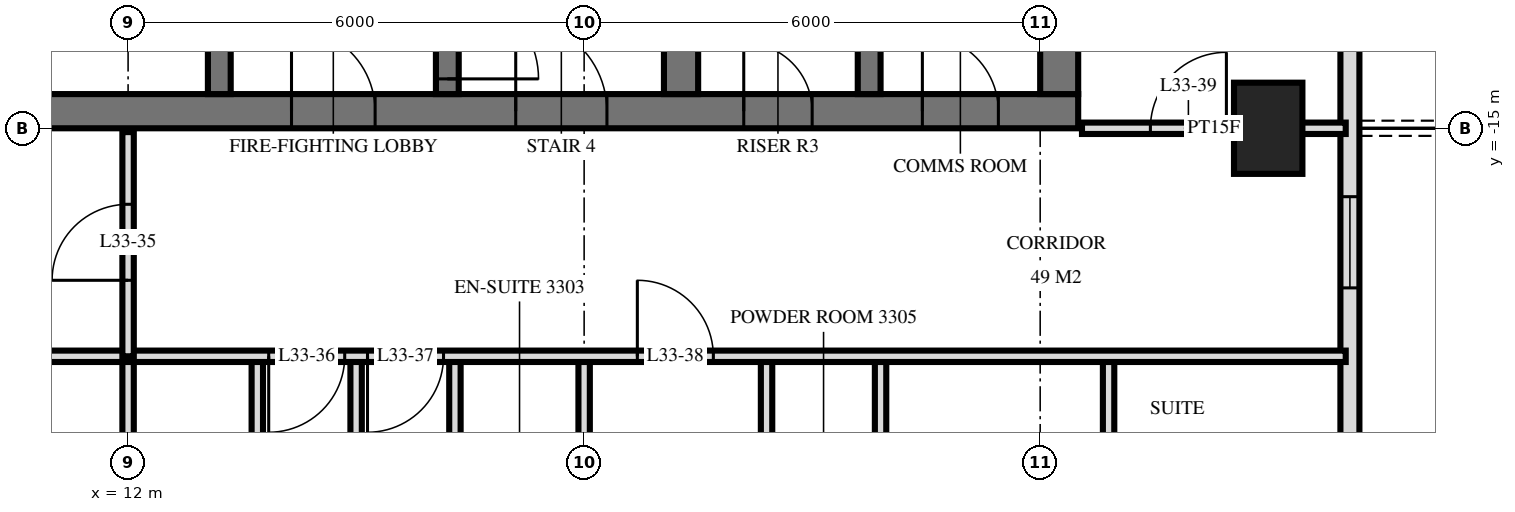
"""IFC4 building model, lengths in metres.
Left out: names, types, materials, properties, quantities, classifications, styles, units other than length and angle.
Written with IfcOpenShell. Run it as: python <this file> out.ifc"""

import sys

from ifc_helpers import new_model, si_unit, direction, frame, frame_2d, origin, origin_2d, place, context, subcontext, project, spatial, rectangle, extrude, element, fill, save


model = new_model("IFC4")
c1 = context("Model", 3, precision=1e-05, world=origin(), true_north=direction((0.0, 1.0)))
c2 = subcontext(c1, "Body", "Model", "MODEL_VIEW")
j1 = project(units=[si_unit("LENGTHUNIT", "METRE"), si_unit("PLANEANGLEUNIT", "RADIAN")], contexts=[c1])
p1 = place(None, origin())
s1 = spatial("IfcSite", under=j1, at=p1, CompositionType="ELEMENT")
p2 = place(p1, origin())
s2 = spatial("IfcBuilding", under=s1, at=p2, CompositionType="ELEMENT")
p3 = place(p2, frame((0.0, 0.0, 130.8)))
s3 = spatial("IfcBuildingStorey", under=s2, at=p3, CompositionType="ELEMENT", Elevation=130.8)
p4 = place(p3, frame((27.0, -15.0, 0.0), z_axis=(0.0, 0.0, 1.0), x_axis=(0.0, 1.0, 0.0)))
e1 = element("IfcColumn", 1, at=p4, inside=s3, PredefinedType="COLUMN", context=c2, shape_type="SweptSolid", body=[
    extrude(rectangle(XDim=1.2, YDim=0.9, at=origin_2d()), origin(), (0.0, 0.0, 1.0), 3.6),
])
p5 = place(p3, frame((10.0, -14.775, 0.0), z_axis=(0.0, 0.0, 1.0), x_axis=(1.0, 0.0, 0.0)))
e2 = element("IfcWall", 2, at=p5, inside=s3, PredefinedType="SHEAR", context=c2, shape_type="SweptSolid", body=[
    extrude(rectangle(XDim=14.5, YDim=0.45, at=frame_2d((7.25, 0.0))), origin(), (0.0, 0.0, 1.0), 3.6),
])
p6 = place(p5, frame((7.1, 0.0, 0.0)))
e3 = element("IfcOpeningElement", 3, at=p6, cuts=e2, PredefinedType="OPENING", context=c2, shape_type="SweptSolid", body=[
    extrude(rectangle(XDim=1.2, YDim=2.1, at=frame_2d((0.6, 1.05))), frame((0.0, 0.235, 0.0), z_axis=(0.0, -1.0, 0.0), x_axis=(1.0, 0.0, 0.0)), (0.0, 0.0, 1.0), 0.47),
])
p7 = place(p5, frame((4.15, 0.0, 0.0)))
e4 = element("IfcOpeningElement", 4, at=p7, cuts=e2, PredefinedType="OPENING", context=c2, shape_type="SweptSolid", body=[
    extrude(rectangle(XDim=1.1, YDim=2.1, at=frame_2d((0.55, 1.05))), frame((0.0, 0.235, 0.0), z_axis=(0.0, -1.0, 0.0), x_axis=(1.0, 0.0, 0.0)), (0.0, 0.0, 1.0), 0.47),
])
p8 = place(p5, frame((10.1, 0.0, 0.0)))
e5 = element("IfcOpeningElement", 5, at=p8, cuts=e2, PredefinedType="OPENING", context=c2, shape_type="SweptSolid", body=[
    extrude(rectangle(XDim=0.9, YDim=2.1, at=frame_2d((0.45, 1.05))), frame((0.0, 0.235, 0.0), z_axis=(0.0, -1.0, 0.0), x_axis=(1.0, 0.0, 0.0)), (0.0, 0.0, 1.0), 0.47),
])
p9 = place(p5, frame((12.45, 0.0, 0.0)))
e6 = element("IfcOpeningElement", 6, at=p9, cuts=e2, PredefinedType="OPENING", context=c2, shape_type="SweptSolid", body=[
    extrude(rectangle(XDim=1.0, YDim=2.1, at=frame_2d((0.5, 1.05))), frame((0.0, 0.235, 0.0), z_axis=(0.0, -1.0, 0.0), x_axis=(1.0, 0.0, 0.0)), (0.0, 0.0, 1.0), 0.47),
])
p10 = place(p3, frame((24.25, -14.55, 0.0), z_axis=(0.0, 0.0, 1.0), x_axis=(0.0, 1.0, 0.0)))
e7 = element("IfcWall", 7, at=p10, inside=s3, PredefinedType="SHEAR", context=c2, shape_type="SweptSolid", body=[
    extrude(rectangle(XDim=14.1, YDim=0.5, at=frame_2d((7.05, 0.0))), origin(), (0.0, 0.0, 1.0), 3.6),
])
p11 = place(p3, frame((13.2, -14.55, 0.0), z_axis=(0.0, 0.0, 1.0), x_axis=(0.0, 1.0, 0.0)))
e8 = element("IfcWall", 8, at=p11, inside=s3, PredefinedType="SHEAR", context=c2, shape_type="SweptSolid", body=[
    extrude(rectangle(XDim=5.4, YDim=0.3, at=frame_2d((2.7, 0.0))), origin(), (0.0, 0.0, 1.0), 3.6),
])
p12 = place(p11, frame((4.0, 0.0, 0.0)))
e9 = element("IfcOpeningElement", 9, at=p12, cuts=e8, PredefinedType="OPENING", context=c2, shape_type="SweptSolid", body=[
    extrude(rectangle(XDim=1.2, YDim=2.1, at=frame_2d((0.6, 1.05))), frame((0.0, 0.16, 0.0), z_axis=(0.0, -1.0, 0.0), x_axis=(1.0, 0.0, 0.0)), (0.0, 0.0, 1.0), 0.32),
])
p13 = place(p3, frame((16.2, -14.55, 0.0), z_axis=(0.0, 0.0, 1.0), x_axis=(0.0, 1.0, 0.0)))
e10 = element("IfcWall", 10, at=p13, inside=s3, PredefinedType="SHEAR", context=c2, shape_type="SweptSolid", body=[
    extrude(rectangle(XDim=5.4, YDim=0.3, at=frame_2d((2.7, 0.0))), origin(), (0.0, 0.0, 1.0), 3.6),
])
p14 = place(p13, frame((0.2, 0.0, 0.0)))
e11 = element("IfcOpeningElement", 11, at=p14, cuts=e10, PredefinedType="OPENING", context=c2, shape_type="SweptSolid", body=[
    extrude(rectangle(XDim=1.2, YDim=2.1, at=frame_2d((0.6, 1.05))), frame((0.0, 0.16, 0.0), z_axis=(0.0, -1.0, 0.0), x_axis=(1.0, 0.0, 0.0)), (0.0, 0.0, 1.0), 0.32),
])
p15 = place(p3, frame((19.275, -14.55, 0.0), z_axis=(0.0, 0.0, 1.0), x_axis=(0.0, 1.0, 0.0)))
e12 = element("IfcWall", 12, at=p15, inside=s3, PredefinedType="SHEAR", context=c2, shape_type="SweptSolid", body=[
    extrude(rectangle(XDim=5.4, YDim=0.45, at=frame_2d((2.7, 0.0))), origin(), (0.0, 0.0, 1.0), 3.6),
])
p16 = place(p3, frame((21.75, -14.55, 0.0), z_axis=(0.0, 0.0, 1.0), x_axis=(0.0, 1.0, 0.0)))
e13 = element("IfcWall", 13, at=p16, inside=s3, PredefinedType="SHEAR", context=c2, shape_type="SweptSolid", body=[
    extrude(rectangle(XDim=5.4, YDim=0.3, at=frame_2d((2.7, 0.0))), origin(), (0.0, 0.0, 1.0), 3.6),
])
p17 = place(p3, frame((28.075, -29.275, 0.0), z_axis=(0.0, 0.0, 1.0), x_axis=(0.0, 1.0, 0.0)))
e14 = element("IfcWall", 14, at=p17, inside=s3, PredefinedType="SOLIDWALL", context=c2, shape_type="SweptSolid", body=[
    extrude(rectangle(XDim=25.951, YDim=0.25, at=frame_2d((12.975, 0.0))), origin(), (0.0, 0.0, 1.0), 3.32),
])
p18 = place(p17, frame((0.575, 0.0, 0.0)))
e15 = element("IfcOpeningElement", 15, at=p18, cuts=e14, PredefinedType="OPENING", context=c2, shape_type="SweptSolid", body=[
    extrude(rectangle(XDim=1.8, YDim=2.4, at=frame_2d((0.9, 1.2))), frame((0.0, 0.135, 0.0), z_axis=(0.0, -1.0, 0.0), x_axis=(1.0, 0.0, 0.0)), (0.0, 0.0, 1.0), 0.27),
])
p19 = place(p17, frame((3.325, 0.0, 0.3)))
e16 = element("IfcOpeningElement", 16, at=p19, cuts=e14, PredefinedType="OPENING", context=c2, shape_type="SweptSolid", body=[
    extrude(rectangle(XDim=1.8, YDim=2.1, at=frame_2d((0.9, 1.05))), frame((0.0, 0.135, 0.0), z_axis=(0.0, -1.0, 0.0), x_axis=(1.0, 0.0, 0.0)), (0.0, 0.0, 1.0), 0.27),
])
p20 = place(p17, frame((8.275, 0.0, 0.0)))
e17 = element("IfcOpeningElement", 17, at=p20, cuts=e14, PredefinedType="OPENING", context=c2, shape_type="SweptSolid", body=[
    extrude(rectangle(XDim=1.8, YDim=2.4, at=frame_2d((0.9, 1.2))), frame((0.0, 0.135, 0.0), z_axis=(0.0, -1.0, 0.0), x_axis=(1.0, 0.0, 0.0)), (0.0, 0.0, 1.0), 0.27),
])
p21 = place(p17, frame((12.175, 0.0, 0.3)))
e18 = element("IfcOpeningElement", 18, at=p21, cuts=e14, PredefinedType="OPENING", context=c2, shape_type="SweptSolid", body=[
    extrude(rectangle(XDim=1.2, YDim=2.1, at=frame_2d((0.6, 1.05))), frame((0.0, 0.135, 0.0), z_axis=(0.0, -1.0, 0.0), x_axis=(1.0, 0.0, 0.0)), (0.0, 0.0, 1.0), 0.27),
])
p22 = place(p17, frame((16.375, 0.0, 0.0)))
e19 = element("IfcOpeningElement", 19, at=p22, cuts=e14, PredefinedType="OPENING", context=c2, shape_type="SweptSolid", body=[
    extrude(rectangle(XDim=1.8, YDim=2.4, at=frame_2d((0.9, 1.2))), frame((0.0, 0.135, 0.0), z_axis=(0.0, -1.0, 0.0), x_axis=(1.0, 0.0, 0.0)), (0.0, 0.0, 1.0), 0.27),
])
p23 = place(p3, frame((24.9, -22.2, 0.0), z_axis=(0.0, 0.0, 1.0), x_axis=(0.0, 1.0, 0.0)))
e20 = element("IfcWall", 20, at=p23, inside=s3, PredefinedType="PARTITIONING", context=c2, shape_type="SweptSolid", body=[
    extrude(rectangle(XDim=4.2, YDim=0.15, at=frame_2d((2.1, 0.0))), origin(), (0.0, 0.0, 1.0), 3.32),
])
p24 = place(p3, frame((21.9, -22.2, 0.0), z_axis=(0.0, 0.0, 1.0), x_axis=(0.0, 1.0, 0.0)))
e21 = element("IfcWall", 21, at=p24, inside=s3, PredefinedType="PLUMBINGWALL", context=c2, shape_type="SweptSolid", body=[
    extrude(rectangle(XDim=4.2, YDim=0.15, at=frame_2d((2.1, 0.0))), origin(), (0.0, 0.0, 1.0), 3.32),
])
p25 = place(p3, frame((20.4, -22.2, 0.0), z_axis=(0.0, 0.0, 1.0), x_axis=(0.0, 1.0, 0.0)))
e22 = element("IfcWall", 22, at=p25, inside=s3, PredefinedType="PARTITIONING", context=c2, shape_type="SweptSolid", body=[
    extrude(rectangle(XDim=4.2, YDim=0.15, at=frame_2d((2.1, 0.0))), origin(), (0.0, 0.0, 1.0), 3.32),
])
p26 = place(p25, frame((1.6, 0.0, 0.0)))
e23 = element("IfcOpeningElement", 23, at=p26, cuts=e22, PredefinedType="OPENING", context=c2, shape_type="SweptSolid", body=[
    extrude(rectangle(XDim=1.0, YDim=2.1, at=frame_2d((0.5, 1.05))), frame((0.0, 0.085, 0.0), z_axis=(0.0, -1.0, 0.0), x_axis=(1.0, 0.0, 0.0)), (0.0, 0.0, 1.0), 0.17),
])
p27 = place(p3, frame((18.0, -22.2, 0.0), z_axis=(0.0, 0.0, 1.0), x_axis=(0.0, 1.0, 0.0)))
e24 = element("IfcWall", 24, at=p27, inside=s3, PredefinedType="PARTITIONING", context=c2, shape_type="SweptSolid", body=[
    extrude(rectangle(XDim=4.2, YDim=0.15, at=frame_2d((2.1, 0.0))), origin(), (0.0, 0.0, 1.0), 3.32),
])
p28 = place(p3, frame((16.3, -23.0, 0.0), z_axis=(0.0, 0.0, 1.0), x_axis=(0.0, 1.0, 0.0)))
e25 = element("IfcWall", 25, at=p28, inside=s3, PredefinedType="PARTITIONING", context=c2, shape_type="SweptSolid", body=[
    extrude(rectangle(XDim=5.0, YDim=0.15, at=frame_2d((2.5, 0.0))), origin(), (0.0, 0.0, 1.0), 3.32),
])
p29 = place(p28, frame((2.12, 0.0, 0.0)))
e26 = element("IfcOpeningElement", 26, at=p29, cuts=e25, PredefinedType="OPENING", context=c2, shape_type="SweptSolid", body=[
    extrude(rectangle(XDim=0.8, YDim=2.1, at=frame_2d((0.4, 1.05))), frame((0.0, 0.085, 0.0), z_axis=(0.0, -1.0, 0.0), x_axis=(1.0, 0.0, 0.0)), (0.0, 0.0, 1.0), 0.17),
])
p30 = place(p3, frame((15.0, -33.62, 0.0), z_axis=(0.0, 0.0, 1.0), x_axis=(0.0, 1.0, 0.0)))
e27 = element("IfcWall", 27, at=p30, inside=s3, PredefinedType="PARTITIONING", context=c2, shape_type="SweptSolid", body=[
    extrude(rectangle(XDim=15.62, YDim=0.15, at=frame_2d((7.81, 0.0))), origin(), (0.0, 0.0, 1.0), 3.32),
])
p31 = place(p3, frame((13.7, -23.0, 0.0), z_axis=(0.0, 0.0, 1.0), x_axis=(0.0, 1.0, 0.0)))
e28 = element("IfcWall", 28, at=p31, inside=s3, PredefinedType="PARTITIONING", context=c2, shape_type="SweptSolid", body=[
    extrude(rectangle(XDim=5.0, YDim=0.15, at=frame_2d((2.5, 0.0))), origin(), (0.0, 0.0, 1.0), 3.32),
])
p32 = place(p31, frame((2.08, 0.0, 0.0)))
e29 = element("IfcOpeningElement", 29, at=p32, cuts=e28, PredefinedType="OPENING", context=c2, shape_type="SweptSolid", body=[
    extrude(rectangle(XDim=0.8, YDim=2.1, at=frame_2d((0.4, 1.05))), frame((0.0, 0.085, 0.0), z_axis=(0.0, -1.0, 0.0), x_axis=(1.0, 0.0, 0.0)), (0.0, 0.0, 1.0), 0.17),
])
p33 = place(p3, frame((12.0, -18.0, 0.0), z_axis=(0.0, 0.0, 1.0), x_axis=(0.0, 1.0, 0.0)))
e30 = element("IfcWall", 30, at=p33, inside=s3, PredefinedType="PARTITIONING", context=c2, shape_type="SweptSolid", body=[
    extrude(rectangle(XDim=2.95, YDim=0.15, at=frame_2d((1.475, 0.0))), origin(), (0.0, 0.0, 1.0), 3.32),
])
p34 = place(p33, frame((1.0, 0.0, 0.0)))
e31 = element("IfcOpeningElement", 31, at=p34, cuts=e30, PredefinedType="OPENING", context=c2, shape_type="SweptSolid", body=[
    extrude(rectangle(XDim=1.0, YDim=2.1, at=frame_2d((0.5, 1.05))), frame((0.0, 0.085, 0.0), z_axis=(0.0, -1.0, 0.0), x_axis=(1.0, 0.0, 0.0)), (0.0, 0.0, 1.0), 0.17),
])
p35 = place(p3, frame((12.0, -33.62, 0.0), z_axis=(0.0, 0.0, 1.0), x_axis=(0.0, 1.0, 0.0)))
e32 = element("IfcWall", 32, at=p35, inside=s3, PredefinedType="PARTITIONING", context=c2, shape_type="SweptSolid", body=[
    extrude(rectangle(XDim=15.62, YDim=0.15, at=frame_2d((7.81, 0.0))), origin(), (0.0, 0.0, 1.0), 3.32),
])
p36 = place(p3, frame((-28.02, -18.0, 0.0), z_axis=(0.0, 0.0, 1.0), x_axis=(1.0, 0.0, 0.0)))
e33 = element("IfcWall", 33, at=p36, inside=s3, PredefinedType="PARTITIONING", context=c2, shape_type="SweptSolid", body=[
    extrude(rectangle(XDim=56.04, YDim=0.15, at=frame_2d((28.02, 0.0))), origin(), (0.0, 0.0, 1.0), 3.32),
])
p37 = place(p36, frame((13.17, 0.0, 0.0)))
e34 = element("IfcOpeningElement", 34, at=p37, cuts=e33, PredefinedType="OPENING", context=c2, shape_type="SweptSolid", body=[
    extrude(rectangle(XDim=1.0, YDim=2.1, at=frame_2d((0.5, 1.05))), frame((0.0, 0.085, 0.0), z_axis=(0.0, -1.0, 0.0), x_axis=(1.0, 0.0, 0.0)), (0.0, 0.0, 1.0), 0.17),
])
p38 = place(p36, frame((11.32, 0.0, 0.0)))
e35 = element("IfcOpeningElement", 35, at=p38, cuts=e33, PredefinedType="OPENING", context=c2, shape_type="SweptSolid", body=[
    extrude(rectangle(XDim=1.0, YDim=2.1, at=frame_2d((0.5, 1.05))), frame((0.0, 0.085, 0.0), z_axis=(0.0, -1.0, 0.0), x_axis=(1.0, 0.0, 0.0)), (0.0, 0.0, 1.0), 0.17),
])
p39 = place(p36, frame((41.87, 0.0, 0.0)))
e36 = element("IfcOpeningElement", 36, at=p39, cuts=e33, PredefinedType="OPENING", context=c2, shape_type="SweptSolid", body=[
    extrude(rectangle(XDim=1.0, YDim=2.1, at=frame_2d((0.5, 1.05))), frame((0.0, 0.085, 0.0), z_axis=(0.0, -1.0, 0.0), x_axis=(1.0, 0.0, 0.0)), (0.0, 0.0, 1.0), 0.17),
])
p40 = place(p36, frame((43.17, 0.0, 0.0)))
e37 = element("IfcOpeningElement", 37, at=p40, cuts=e33, PredefinedType="OPENING", context=c2, shape_type="SweptSolid", body=[
    extrude(rectangle(XDim=1.0, YDim=2.1, at=frame_2d((0.5, 1.05))), frame((0.0, 0.085, 0.0), z_axis=(0.0, -1.0, 0.0), x_axis=(1.0, 0.0, 0.0)), (0.0, 0.0, 1.0), 0.17),
])
p41 = place(p36, frame((46.72, 0.0, 0.0)))
e38 = element("IfcOpeningElement", 38, at=p41, cuts=e33, PredefinedType="OPENING", context=c2, shape_type="SweptSolid", body=[
    extrude(rectangle(XDim=1.0, YDim=2.1, at=frame_2d((0.5, 1.05))), frame((0.0, 0.085, 0.0), z_axis=(0.0, -1.0, 0.0), x_axis=(1.0, 0.0, 0.0)), (0.0, 0.0, 1.0), 0.17),
])
p42 = place(p36, frame((21.52, 0.0, 0.0)))
e39 = element("IfcOpeningElement", 39, at=p42, cuts=e33, PredefinedType="OPENING", context=c2, shape_type="SweptSolid", body=[
    extrude(rectangle(XDim=1.0, YDim=2.1, at=frame_2d((0.5, 1.05))), frame((0.0, 0.085, 0.0), z_axis=(0.0, -1.0, 0.0), x_axis=(1.0, 0.0, 0.0)), (0.0, 0.0, 1.0), 0.17),
])
p43 = place(p36, frame((33.52, 0.0, 0.0)))
e40 = element("IfcOpeningElement", 40, at=p43, cuts=e33, PredefinedType="OPENING", context=c2, shape_type="SweptSolid", body=[
    extrude(rectangle(XDim=1.0, YDim=2.1, at=frame_2d((0.5, 1.05))), frame((0.0, 0.085, 0.0), z_axis=(0.0, -1.0, 0.0), x_axis=(1.0, 0.0, 0.0)), (0.0, 0.0, 1.0), 0.17),
])
p44 = place(p3, frame((24.55, -15.0, 0.0), z_axis=(0.0, 0.0, 1.0), x_axis=(1.0, 0.0, 0.0)))
e41 = element("IfcWall", 41, at=p44, inside=s3, PredefinedType="PARTITIONING", context=c2, shape_type="SweptSolid", body=[
    extrude(rectangle(XDim=3.47, YDim=0.15, at=frame_2d((1.735, 0.0))), origin(), (0.0, 0.0, 1.0), 3.32),
])
p45 = place(p44, frame((0.9, 0.0, 0.0)))
e42 = element("IfcOpeningElement", 42, at=p45, cuts=e41, PredefinedType="OPENING", context=c2, shape_type="SweptSolid", body=[
    extrude(rectangle(XDim=1.0, YDim=2.1, at=frame_2d((0.5, 1.05))), frame((0.0, 0.085, 0.0), z_axis=(0.0, -1.0, 0.0), x_axis=(1.0, 0.0, 0.0)), (0.0, 0.0, 1.0), 0.17),
])
p46 = place(p21, origin())
e43 = element("IfcWindow", 43, at=p46, inside=s3, PartitioningType="SINGLE_PANEL", PredefinedType="WINDOW", context=c2, shape_type="SweptSolid", body=[
    extrude(rectangle(XDim=1.2, YDim=2.1, at=frame_2d((0.6, 1.05))), frame((0.0, 0.03, 0.0), z_axis=(0.0, -1.0, 0.0), x_axis=(1.0, 0.0, 0.0)), (0.0, 0.0, 1.0), 0.06),
])
fill(e18, e43)
p47 = place(p6, origin())
e44 = element("IfcDoor", 44, at=p47, inside=s3, OperationType="SINGLE_SWING_RIGHT", PredefinedType="DOOR", context=c2, shape_type="SweptSolid", body=[
    extrude(rectangle(XDim=1.2, YDim=2.1, at=frame_2d((0.6, 1.05))), frame((0.0, 0.025, 0.0), z_axis=(0.0, -1.0, 0.0), x_axis=(1.0, 0.0, 0.0)), (0.0, 0.0, 1.0), 0.05),
])
fill(e3, e44)
p48 = place(p7, origin())
e45 = element("IfcDoor", 45, at=p48, inside=s3, OperationType="SINGLE_SWING_RIGHT", PredefinedType="DOOR", context=c2, shape_type="SweptSolid", body=[
    extrude(rectangle(XDim=1.1, YDim=2.1, at=frame_2d((0.55, 1.05))), frame((0.0, 0.025, 0.0), z_axis=(0.0, -1.0, 0.0), x_axis=(1.0, 0.0, 0.0)), (0.0, 0.0, 1.0), 0.05),
])
fill(e4, e45)
p49 = place(p8, origin())
e46 = element("IfcDoor", 46, at=p49, inside=s3, OperationType="SINGLE_SWING_RIGHT", PredefinedType="DOOR", context=c2, shape_type="SweptSolid", body=[
    extrude(rectangle(XDim=0.9, YDim=2.1, at=frame_2d((0.45, 1.05))), frame((0.0, 0.025, 0.0), z_axis=(0.0, -1.0, 0.0), x_axis=(1.0, 0.0, 0.0)), (0.0, 0.0, 1.0), 0.05),
])
fill(e5, e46)
p50 = place(p9, origin())
e47 = element("IfcDoor", 47, at=p50, inside=s3, OperationType="SINGLE_SWING_RIGHT", PredefinedType="DOOR", context=c2, shape_type="SweptSolid", body=[
    extrude(rectangle(XDim=1.0, YDim=2.1, at=frame_2d((0.5, 1.05))), frame((0.0, 0.025, 0.0), z_axis=(0.0, -1.0, 0.0), x_axis=(1.0, 0.0, 0.0)), (0.0, 0.0, 1.0), 0.05),
])
fill(e6, e47)
p51 = place(p14, frame((0.6, 0.0, 0.0), z_axis=(0.0, 0.0, 1.0), x_axis=(-1.0, 0.0, 0.0)))
e48 = element("IfcDoor", 48, at=p51, inside=s3, OperationType="SINGLE_SWING_LEFT", PredefinedType="DOOR", context=c2, shape_type="SweptSolid", body=[
    extrude(rectangle(XDim=1.2, YDim=2.1, at=frame_2d((0.0, 1.05))), frame((0.0, -0.025, 0.0), z_axis=(0.0, 1.0, 0.0), x_axis=(-1.0, 0.0, 0.0)), (0.0, 0.0, 1.0), 0.05),
])
fill(e11, e48)
p52 = place(p34, origin())
e49 = element("IfcDoor", 49, at=p52, inside=s3, OperationType="SINGLE_SWING_RIGHT", PredefinedType="DOOR", context=c2, shape_type="SweptSolid", body=[
    extrude(rectangle(XDim=1.0, YDim=2.1, at=frame_2d((0.5, 1.05))), frame((0.0, 0.025, 0.0), z_axis=(0.0, -1.0, 0.0), x_axis=(1.0, 0.0, 0.0)), (0.0, 0.0, 1.0), 0.05),
])
fill(e31, e49)
p53 = place(p39, frame((0.5, 0.0, 0.0), z_axis=(0.0, 0.0, 1.0), x_axis=(-1.0, 0.0, 0.0)))
e50 = element("IfcDoor", 50, at=p53, inside=s3, OperationType="SINGLE_SWING_LEFT", PredefinedType="DOOR", context=c2, shape_type="SweptSolid", body=[
    extrude(rectangle(XDim=1.0, YDim=2.1, at=frame_2d((0.0, 1.05))), frame((0.0, -0.025, 0.0), z_axis=(0.0, 1.0, 0.0), x_axis=(-1.0, 0.0, 0.0)), (0.0, 0.0, 1.0), 0.05),
])
fill(e36, e50)
p54 = place(p40, frame((0.5, 0.0, 0.0), z_axis=(0.0, 0.0, 1.0), x_axis=(-1.0, 0.0, 0.0)))
e51 = element("IfcDoor", 51, at=p54, inside=s3, OperationType="SINGLE_SWING_LEFT", PredefinedType="DOOR", context=c2, shape_type="SweptSolid", body=[
    extrude(rectangle(XDim=1.0, YDim=2.1, at=frame_2d((0.0, 1.05))), frame((0.0, -0.025, 0.0), z_axis=(0.0, 1.0, 0.0), x_axis=(-1.0, 0.0, 0.0)), (0.0, 0.0, 1.0), 0.05),
])
fill(e37, e51)
p55 = place(p41, origin())
e52 = element("IfcDoor", 52, at=p55, inside=s3, OperationType="SINGLE_SWING_RIGHT", PredefinedType="DOOR", context=c2, shape_type="SweptSolid", body=[
    extrude(rectangle(XDim=1.0, YDim=2.1, at=frame_2d((0.5, 1.05))), frame((0.0, 0.025, 0.0), z_axis=(0.0, -1.0, 0.0), x_axis=(1.0, 0.0, 0.0)), (0.0, 0.0, 1.0), 0.05),
])
fill(e38, e52)
p56 = place(p45, origin())
e53 = element("IfcDoor", 53, at=p56, inside=s3, OperationType="SINGLE_SWING_LEFT", PredefinedType="DOOR", context=c2, shape_type="SweptSolid", body=[
    extrude(rectangle(XDim=1.0, YDim=2.1, at=frame_2d((0.5, 1.05))), frame((0.0, 0.025, 0.0), z_axis=(0.0, -1.0, 0.0), x_axis=(1.0, 0.0, 0.0)), (0.0, 0.0, 1.0), 0.05),
])
fill(e42, e53)
save(model, sys.argv[1])
